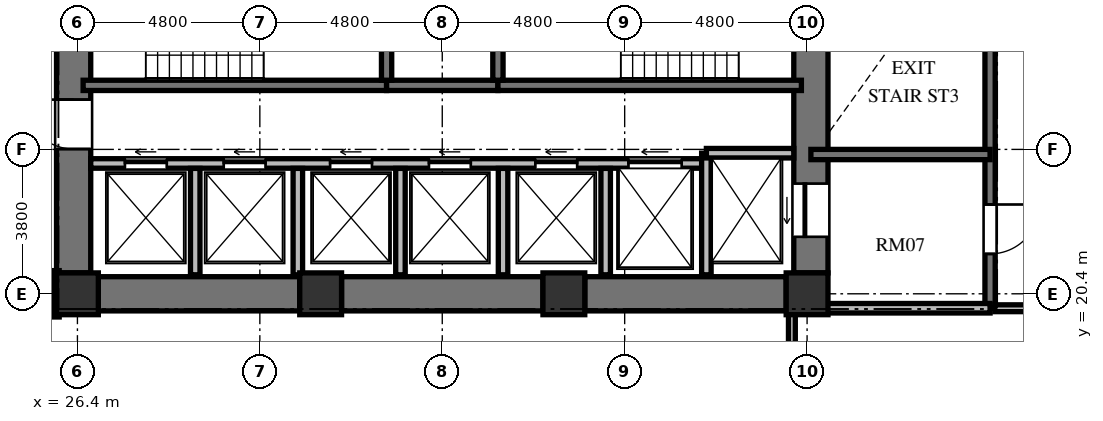
"""IFC4 building model, lengths in metres.
Left out: names, types, materials, properties, quantities, classifications, styles, units other than length and angle.
Written with IfcOpenShell. Run it as: python <this file> out.ifc"""

import sys

from ifc_helpers import new_model, si_unit, direction, frame, frame_2d, origin, origin_2d, place, context, subcontext, project, spatial, rectangle, extrude, element, fill, save


model = new_model("IFC4")
c1 = context("Model", 3, precision=1e-05, world=origin(), true_north=direction((0.0, 1.0)))
c2 = subcontext(c1, "Body", "Model", "MODEL_VIEW")
j1 = project(units=[si_unit("LENGTHUNIT", "METRE"), si_unit("PLANEANGLEUNIT", "RADIAN")], contexts=[c1])
p1 = place(None, origin())
s1 = spatial("IfcSite", under=j1, at=p1, CompositionType="ELEMENT")
p2 = place(p1, origin())
s2 = spatial("IfcBuilding", under=s1, at=p2, CompositionType="ELEMENT")
p3 = place(p2, frame((0.0, 0.0, 28.848)))
s3 = spatial("IfcBuildingStorey", under=s2, at=p3, CompositionType="ELEMENT", Elevation=28.848)
for number, where, z_axis, x_axis in (
    (1, (26.4, 20.4, 0.0), (0.0, 0.0, 1.0), (1.0, 0.0, 0.0)),
    (2, (32.8, 20.4, 0.0), (0.0, 0.0, 1.0), (1.0, 0.0, 0.0)),
    (3, (39.2, 20.4, 0.0), (0.0, 0.0, 1.0), (1.0, 0.0, 0.0)),
    (4, (45.6, 20.4, 0.0), (0.0, 0.0, 1.0), (1.0, 0.0, 0.0)),
):
    element("IfcColumn", number, at=place(p3, frame(where, z_axis=z_axis, x_axis=x_axis)), inside=s3, PredefinedType="COLUMN", context=c2, shape_type="SweptSolid", body=[
        extrude(rectangle(XDim=1.1, YDim=1.1, at=origin_2d()), origin(), (0.0, 0.0, 1.0), 3.648),
    ])
p4 = place(p3, frame((26.3, 20.95, 0.0), z_axis=(0.0, 0.0, 1.0), x_axis=(0.0, 1.0, 0.0)))
e5 = element("IfcWall", 5, at=p4, inside=s3, PredefinedType="SHEAR", context=c2, shape_type="SweptSolid", body=[
    extrude(rectangle(XDim=14.1, YDim=0.9, at=frame_2d((7.05, 0.0))), origin(), (0.0, 0.0, 1.0), 3.648),
])
p5 = place(p4, frame((6.5, 0.0, 0.0)))
e6 = element("IfcOpeningElement", 6, at=p5, cuts=e5, PredefinedType="OPENING", context=c2, shape_type="SweptSolid", body=[
    extrude(rectangle(XDim=1.2, YDim=2.15, at=frame_2d((0.6, 1.075))), frame((0.0, 0.46, 0.0), z_axis=(0.0, -1.0, 0.0), x_axis=(1.0, 0.0, 0.0)), (0.0, 0.0, 1.0), 0.92),
])
p6 = place(p4, frame((9.6, 0.0, 0.0)))
e7 = element("IfcOpeningElement", 7, at=p6, cuts=e5, PredefinedType="OPENING", context=c2, shape_type="SweptSolid", body=[
    extrude(rectangle(XDim=1.3, YDim=2.2, at=frame_2d((0.65, 1.1))), frame((0.0, 0.46, 0.0), z_axis=(0.0, -1.0, 0.0), x_axis=(1.0, 0.0, 0.0)), (0.0, 0.0, 1.0), 0.92),
])
p7 = place(p4, frame((3.26, 0.0, 0.0)))
e8 = element("IfcOpeningElement", 8, at=p7, cuts=e5, PredefinedType="OPENING", context=c2, shape_type="SweptSolid", body=[
    extrude(rectangle(XDim=1.3, YDim=2.2, at=frame_2d((0.65, 1.1))), frame((0.0, 0.46, 0.0), z_axis=(0.0, -1.0, 0.0), x_axis=(1.0, 0.0, 0.0)), (0.0, 0.0, 1.0), 0.92),
])
p8 = place(p3, frame((45.7, 20.95, 0.0), z_axis=(0.0, 0.0, 1.0), x_axis=(0.0, 1.0, 0.0)))
e9 = element("IfcWall", 9, at=p8, inside=s3, PredefinedType="SHEAR", context=c2, shape_type="SweptSolid", body=[
    extrude(rectangle(XDim=14.1, YDim=0.9, at=frame_2d((7.05, 0.0))), origin(), (0.0, 0.0, 1.0), 3.648),
])
p9 = place(p8, frame((11.75, 0.0, 0.0)))
e10 = element("IfcOpeningElement", 10, at=p9, cuts=e9, PredefinedType="OPENING", context=c2, shape_type="SweptSolid", body=[
    extrude(rectangle(XDim=1.4, YDim=2.3, at=frame_2d((0.7, 1.15))), frame((0.0, 0.46, 0.0), z_axis=(0.0, -1.0, 0.0), x_axis=(1.0, 0.0, 0.0)), (0.0, 0.0, 1.0), 0.92),
])
p10 = place(p8, frame((0.95, 0.0, 0.0)))
e11 = element("IfcOpeningElement", 11, at=p10, cuts=e9, PredefinedType="OPENING", context=c2, shape_type="SweptSolid", body=[
    extrude(rectangle(XDim=1.4, YDim=2.3, at=frame_2d((0.7, 1.15))), frame((0.0, 0.46, 0.0), z_axis=(0.0, -1.0, 0.0), x_axis=(1.0, 0.0, 0.0)), (0.0, 0.0, 1.0), 0.92),
])
p11 = place(p3, frame((26.95, 20.4, 0.0), z_axis=(0.0, 0.0, 1.0), x_axis=(1.0, 0.0, 0.0)))
e12 = element("IfcWall", 12, at=p11, inside=s3, PredefinedType="SHEAR", context=c2, shape_type="SweptSolid", body=[
    extrude(rectangle(XDim=5.3, YDim=0.9, at=frame_2d((2.65, 0.0))), origin(), (0.0, 0.0, 1.0), 3.648),
])
p12 = place(p3, frame((33.35, 20.4, 0.0), z_axis=(0.0, 0.0, 1.0), x_axis=(1.0, 0.0, 0.0)))
e13 = element("IfcWall", 13, at=p12, inside=s3, PredefinedType="SHEAR", context=c2, shape_type="SweptSolid", body=[
    extrude(rectangle(XDim=5.3, YDim=0.9, at=frame_2d((2.65, 0.0))), origin(), (0.0, 0.0, 1.0), 3.648),
])
p13 = place(p3, frame((39.75, 20.4, 0.0), z_axis=(0.0, 0.0, 1.0), x_axis=(1.0, 0.0, 0.0)))
e14 = element("IfcWall", 14, at=p13, inside=s3, PredefinedType="SHEAR", context=c2, shape_type="SweptSolid", body=[
    extrude(rectangle(XDim=5.3, YDim=0.9, at=frame_2d((2.65, 0.0))), origin(), (0.0, 0.0, 1.0), 3.648),
])
p14 = place(p3, frame((26.55, 25.885, 0.0), z_axis=(0.0, 0.0, 1.0), x_axis=(1.0, 0.0, 0.0)))
e15 = element("IfcWall", 15, at=p14, inside=s3, PredefinedType="SHEAR", context=c2, shape_type="SweptSolid", body=[
    extrude(rectangle(XDim=7.985, YDim=0.27, at=frame_2d((3.992, 0.0))), origin(), (0.0, 0.0, 1.0), 3.648),
])
p15 = place(p3, frame((34.535, 25.885, 0.0), z_axis=(0.0, 0.0, 1.0), x_axis=(1.0, 0.0, 0.0)))
e16 = element("IfcWall", 16, at=p15, inside=s3, PredefinedType="SHEAR", context=c2, shape_type="SweptSolid", body=[
    extrude(rectangle(XDim=2.93, YDim=0.27, at=frame_2d((1.465, 0.0))), origin(), (0.0, 0.0, 1.0), 3.648),
])
p16 = place(p3, frame((37.465, 25.885, 0.0), z_axis=(0.0, 0.0, 1.0), x_axis=(1.0, 0.0, 0.0)))
e17 = element("IfcWall", 17, at=p16, inside=s3, PredefinedType="SHEAR", context=c2, shape_type="SweptSolid", body=[
    extrude(rectangle(XDim=7.985, YDim=0.27, at=frame_2d((3.992, 0.0))), origin(), (0.0, 0.0, 1.0), 3.648),
])
for number, where, z_axis, x_axis in (
    (18, (34.535, 26.02, 0.0), (0.0, 0.0, 1.0), (0.0, 1.0, 0.0)),
    (19, (37.465, 26.02, 0.0), (0.0, 0.0, 1.0), (0.0, 1.0, 0.0)),
):
    element("IfcWall", number, at=place(p3, frame(where, z_axis=z_axis, x_axis=x_axis)), inside=s3, PredefinedType="SHEAR", context=c2, shape_type="SweptSolid", body=[
        extrude(rectangle(XDim=4.08, YDim=0.27, at=frame_2d((2.04, 0.0))), origin(), (0.0, 0.0, 1.0), 3.648),
    ])
p17 = place(p3, frame((26.75, 23.83, 0.0), z_axis=(0.0, 0.0, 1.0), x_axis=(1.0, 0.0, 0.0)))
e20 = element("IfcWall", 20, at=p17, inside=s3, PredefinedType="SOLIDWALL", context=c2, shape_type="SweptSolid", body=[
    extrude(rectangle(XDim=16.2, YDim=0.25, at=frame_2d((8.1, 0.0))), origin(), (0.0, 0.0, 1.0), 3.428),
])
p18 = place(p17, frame((0.9, 0.0, 0.0)))
e21 = element("IfcOpeningElement", 21, at=p18, cuts=e20, PredefinedType="OPENING", context=c2, shape_type="SweptSolid", body=[
    extrude(rectangle(XDim=1.1, YDim=2.2, at=frame_2d((0.55, 1.1))), frame((0.0, 0.135, 0.0), z_axis=(0.0, -1.0, 0.0), x_axis=(1.0, 0.0, 0.0)), (0.0, 0.0, 1.0), 0.27),
])
p19 = place(p17, frame((3.5, 0.0, 0.0)))
e22 = element("IfcOpeningElement", 22, at=p19, cuts=e20, PredefinedType="OPENING", context=c2, shape_type="SweptSolid", body=[
    extrude(rectangle(XDim=1.1, YDim=2.2, at=frame_2d((0.55, 1.1))), frame((0.0, 0.135, 0.0), z_axis=(0.0, -1.0, 0.0), x_axis=(1.0, 0.0, 0.0)), (0.0, 0.0, 1.0), 0.27),
])
p20 = place(p17, frame((6.3, 0.0, 0.0)))
e23 = element("IfcOpeningElement", 23, at=p20, cuts=e20, PredefinedType="OPENING", context=c2, shape_type="SweptSolid", body=[
    extrude(rectangle(XDim=1.1, YDim=2.2, at=frame_2d((0.55, 1.1))), frame((0.0, 0.135, 0.0), z_axis=(0.0, -1.0, 0.0), x_axis=(1.0, 0.0, 0.0)), (0.0, 0.0, 1.0), 0.27),
])
p21 = place(p17, frame((8.9, 0.0, 0.0)))
e24 = element("IfcOpeningElement", 24, at=p21, cuts=e20, PredefinedType="OPENING", context=c2, shape_type="SweptSolid", body=[
    extrude(rectangle(XDim=1.1, YDim=2.2, at=frame_2d((0.55, 1.1))), frame((0.0, 0.135, 0.0), z_axis=(0.0, -1.0, 0.0), x_axis=(1.0, 0.0, 0.0)), (0.0, 0.0, 1.0), 0.27),
])
p22 = place(p17, frame((11.7, 0.0, 0.0)))
e25 = element("IfcOpeningElement", 25, at=p22, cuts=e20, PredefinedType="OPENING", context=c2, shape_type="SweptSolid", body=[
    extrude(rectangle(XDim=1.1, YDim=2.2, at=frame_2d((0.55, 1.1))), frame((0.0, 0.135, 0.0), z_axis=(0.0, -1.0, 0.0), x_axis=(1.0, 0.0, 0.0)), (0.0, 0.0, 1.0), 0.27),
])
p23 = place(p17, frame((14.15, 0.0, 0.0)))
e26 = element("IfcOpeningElement", 26, at=p23, cuts=e20, PredefinedType="OPENING", context=c2, shape_type="SweptSolid", body=[
    extrude(rectangle(XDim=1.4, YDim=2.3, at=frame_2d((0.7, 1.15))), frame((0.0, 0.135, 0.0), z_axis=(0.0, -1.0, 0.0), x_axis=(1.0, 0.0, 0.0)), (0.0, 0.0, 1.0), 0.27),
])
p24 = place(p3, frame((42.95, 20.9, 0.0), z_axis=(0.0, 0.0, 1.0), x_axis=(0.0, 1.0, 0.0)))
e27 = element("IfcWall", 27, at=p24, inside=s3, PredefinedType="SOLIDWALL", context=c2, shape_type="SweptSolid", body=[
    extrude(rectangle(XDim=3.2, YDim=0.25, at=frame_2d((1.6, 0.0))), origin(), (0.0, 0.0, 1.0), 3.428),
])
p25 = place(p3, frame((42.95, 24.1, 0.0), z_axis=(0.0, 0.0, 1.0), x_axis=(1.0, 0.0, 0.0)))
e28 = element("IfcWall", 28, at=p25, inside=s3, PredefinedType="SOLIDWALL", context=c2, shape_type="SweptSolid", body=[
    extrude(rectangle(XDim=2.3, YDim=0.25, at=frame_2d((1.15, 0.0))), origin(), (0.0, 0.0, 1.0), 3.428),
])
for number, where, z_axis, x_axis in (
    (29, (29.5, 20.9, 0.0), (0.0, 0.0, 1.0), (0.0, 1.0, 0.0)),
    (30, (32.2, 20.9, 0.0), (0.0, 0.0, 1.0), (0.0, 1.0, 0.0)),
    (31, (34.9, 20.9, 0.0), (0.0, 0.0, 1.0), (0.0, 1.0, 0.0)),
    (32, (37.6, 20.9, 0.0), (0.0, 0.0, 1.0), (0.0, 1.0, 0.0)),
    (33, (40.3, 20.9, 0.0), (0.0, 0.0, 1.0), (0.0, 1.0, 0.0)),
):
    element("IfcWall", number, at=place(p3, frame(where, z_axis=z_axis, x_axis=x_axis)), inside=s3, PredefinedType="SOLIDWALL", context=c2, shape_type="SweptSolid", body=[
        extrude(rectangle(XDim=2.8, YDim=0.25, at=frame_2d((1.4, 0.0))), origin(), (0.0, 0.0, 1.0), 3.428),
    ])
p26 = place(p3, frame((50.415, 35.845, 0.0), z_axis=(0.0, 0.0, 1.0), x_axis=(0.0, -1.0, 0.0)))
e34 = element("IfcWall", 34, at=p26, inside=s3, PredefinedType="SHEAR", context=c2, shape_type="SweptSolid", body=[
    extrude(rectangle(XDim=15.825, YDim=0.27, at=frame_2d((7.913, 0.0))), origin(), (0.0, 0.0, 1.0), 3.648),
])
p27 = place(p26, frame((4.445, 0.0, 0.0)))
e35 = element("IfcOpeningElement", 35, at=p27, cuts=e34, PredefinedType="OPENING", context=c2, shape_type="SweptSolid", body=[
    extrude(rectangle(XDim=1.2, YDim=2.15, at=frame_2d((0.6, 1.075))), frame((0.0, 0.145, 0.0), z_axis=(0.0, -1.0, 0.0), x_axis=(1.0, 0.0, 0.0)), (0.0, 0.0, 1.0), 0.29),
])
p28 = place(p26, frame((1.295, 0.0, 0.0)))
e36 = element("IfcOpeningElement", 36, at=p28, cuts=e34, PredefinedType="OPENING", context=c2, shape_type="SweptSolid", body=[
    extrude(rectangle(XDim=1.3, YDim=2.2, at=frame_2d((0.65, 1.1))), frame((0.0, 0.145, 0.0), z_axis=(0.0, -1.0, 0.0), x_axis=(1.0, 0.0, 0.0)), (0.0, 0.0, 1.0), 0.29),
])
p29 = place(p26, frame((13.095, 0.0, 0.0)))
e37 = element("IfcOpeningElement", 37, at=p29, cuts=e34, PredefinedType="OPENING", context=c2, shape_type="SweptSolid", body=[
    extrude(rectangle(XDim=1.3, YDim=2.2, at=frame_2d((0.65, 1.1))), frame((0.0, 0.145, 0.0), z_axis=(0.0, -1.0, 0.0), x_axis=(1.0, 0.0, 0.0)), (0.0, 0.0, 1.0), 0.29),
])
p30 = place(p3, frame((45.7, 24.065, 0.0), z_axis=(0.0, 0.0, 1.0), x_axis=(1.0, 0.0, 0.0)))
e38 = element("IfcWall", 38, at=p30, inside=s3, PredefinedType="SHEAR", context=c2, shape_type="SweptSolid", body=[
    extrude(rectangle(XDim=4.715, YDim=0.27, at=frame_2d((2.357, 0.0))), origin(), (0.0, 0.0, 1.0), 3.648),
])
p31 = place(p3, frame((45.7, 20.02, 0.0), z_axis=(0.0, 0.0, 1.0), x_axis=(1.0, 0.0, 0.0)))
e39 = element("IfcWall", 39, at=p31, inside=s3, PredefinedType="SOLIDWALL", context=c2, shape_type="SweptSolid", body=[
    extrude(rectangle(XDim=4.715, YDim=0.25, at=frame_2d((2.357, 0.0))), origin(), (0.0, 0.0, 1.0), 2.813),
])
p32 = place(p3, frame((53.19, 20.02, 0.0), z_axis=(0.0, 0.0, 1.0), x_axis=(-1.0, 0.0, 0.0)))
e40 = element("IfcWall", 40, at=p32, inside=s3, PredefinedType="PARTITIONING", context=c2, shape_type="SweptSolid", body=[
    extrude(rectangle(XDim=2.65, YDim=0.18, at=frame_2d((1.325, 0.0))), origin(), (0.0, 0.0, 1.0), 2.813),
])
p33 = place(p3, frame((25.83, 21.01, 0.0), z_axis=(0.0, 0.0, 1.0), x_axis=(0.0, -1.0, 0.0)))
e41 = element("IfcWall", 41, at=p33, inside=s3, PredefinedType="PARTITIONING", context=c2, shape_type="SweptSolid", body=[
    extrude(rectangle(XDim=1.22, YDim=0.18, at=frame_2d((0.61, 0.0))), origin(), (0.0, 0.0, 1.0), 3.428),
])
p34 = place(p3, frame((45.2, 19.91, 0.0), z_axis=(0.0, 0.0, 1.0), x_axis=(0.0, -1.0, 0.0)))
e42 = element("IfcWall", 42, at=p34, inside=s3, PredefinedType="PARTITIONING", context=c2, shape_type="SweptSolid", body=[
    extrude(rectangle(XDim=2.55, YDim=0.18, at=frame_2d((1.275, 0.0))), origin(), (0.0, 0.0, 1.0), 3.428),
])
p35 = place(p7, origin())
e43 = element("IfcDoor", 43, at=p35, inside=s3, OperationType="SINGLE_SWING_RIGHT", PredefinedType="DOOR", context=c2, shape_type="SweptSolid", body=[
    extrude(rectangle(XDim=1.3, YDim=2.2, at=frame_2d((0.65, 1.1))), frame((0.0, 0.025, 0.0), z_axis=(0.0, -1.0, 0.0), x_axis=(1.0, 0.0, 0.0)), (0.0, 0.0, 1.0), 0.05),
])
fill(e8, e43)
p36 = place(p18, origin())
e44 = element("IfcDoor", 44, at=p36, inside=s3, OperationType="SLIDING_TO_LEFT", PredefinedType="DOOR", context=c2, shape_type="SweptSolid", body=[
    extrude(rectangle(XDim=1.1, YDim=2.2, at=frame_2d((0.55, 1.1))), frame((0.0, 0.025, 0.0), z_axis=(0.0, -1.0, 0.0), x_axis=(1.0, 0.0, 0.0)), (0.0, 0.0, 1.0), 0.05),
])
fill(e21, e44)
p37 = place(p19, origin())
e45 = element("IfcDoor", 45, at=p37, inside=s3, OperationType="SLIDING_TO_LEFT", PredefinedType="DOOR", context=c2, shape_type="SweptSolid", body=[
    extrude(rectangle(XDim=1.1, YDim=2.2, at=frame_2d((0.55, 1.1))), frame((0.0, 0.025, 0.0), z_axis=(0.0, -1.0, 0.0), x_axis=(1.0, 0.0, 0.0)), (0.0, 0.0, 1.0), 0.05),
])
fill(e22, e45)
p38 = place(p20, origin())
e46 = element("IfcDoor", 46, at=p38, inside=s3, OperationType="SLIDING_TO_LEFT", PredefinedType="DOOR", context=c2, shape_type="SweptSolid", body=[
    extrude(rectangle(XDim=1.1, YDim=2.2, at=frame_2d((0.55, 1.1))), frame((0.0, 0.025, 0.0), z_axis=(0.0, -1.0, 0.0), x_axis=(1.0, 0.0, 0.0)), (0.0, 0.0, 1.0), 0.05),
])
fill(e23, e46)
p39 = place(p21, origin())
e47 = element("IfcDoor", 47, at=p39, inside=s3, OperationType="SLIDING_TO_LEFT", PredefinedType="DOOR", context=c2, shape_type="SweptSolid", body=[
    extrude(rectangle(XDim=1.1, YDim=2.2, at=frame_2d((0.55, 1.1))), frame((0.0, 0.025, 0.0), z_axis=(0.0, -1.0, 0.0), x_axis=(1.0, 0.0, 0.0)), (0.0, 0.0, 1.0), 0.05),
])
fill(e24, e47)
p40 = place(p22, origin())
e48 = element("IfcDoor", 48, at=p40, inside=s3, OperationType="SLIDING_TO_LEFT", PredefinedType="DOOR", context=c2, shape_type="SweptSolid", body=[
    extrude(rectangle(XDim=1.1, YDim=2.2, at=frame_2d((0.55, 1.1))), frame((0.0, 0.025, 0.0), z_axis=(0.0, -1.0, 0.0), x_axis=(1.0, 0.0, 0.0)), (0.0, 0.0, 1.0), 0.05),
])
fill(e25, e48)
p41 = place(p10, origin())
e49 = element("IfcDoor", 49, at=p41, inside=s3, OperationType="SLIDING_TO_LEFT", PredefinedType="DOOR", context=c2, shape_type="SweptSolid", body=[
    extrude(rectangle(XDim=1.4, YDim=2.3, at=frame_2d((0.7, 1.15))), frame((0.0, 0.025, 0.0), z_axis=(0.0, -1.0, 0.0), x_axis=(1.0, 0.0, 0.0)), (0.0, 0.0, 1.0), 0.05),
])
fill(e11, e49)
p42 = place(p23, origin())
e50 = element("IfcDoor", 50, at=p42, inside=s3, OperationType="SLIDING_TO_LEFT", PredefinedType="DOOR", context=c2, shape_type="SweptSolid", body=[
    extrude(rectangle(XDim=1.4, YDim=2.3, at=frame_2d((0.7, 1.15))), frame((0.0, 0.025, 0.0), z_axis=(0.0, -1.0, 0.0), x_axis=(1.0, 0.0, 0.0)), (0.0, 0.0, 1.0), 0.05),
])
fill(e26, e50)
p43 = place(p29, origin())
e51 = element("IfcDoor", 51, at=p43, inside=s3, OperationType="SINGLE_SWING_LEFT", PredefinedType="DOOR", context=c2, shape_type="SweptSolid", body=[
    extrude(rectangle(XDim=1.3, YDim=2.2, at=frame_2d((0.65, 1.1))), frame((0.0, 0.025, 0.0), z_axis=(0.0, -1.0, 0.0), x_axis=(1.0, 0.0, 0.0)), (0.0, 0.0, 1.0), 0.05),
])
fill(e37, e51)
save(model, sys.argv[1])
